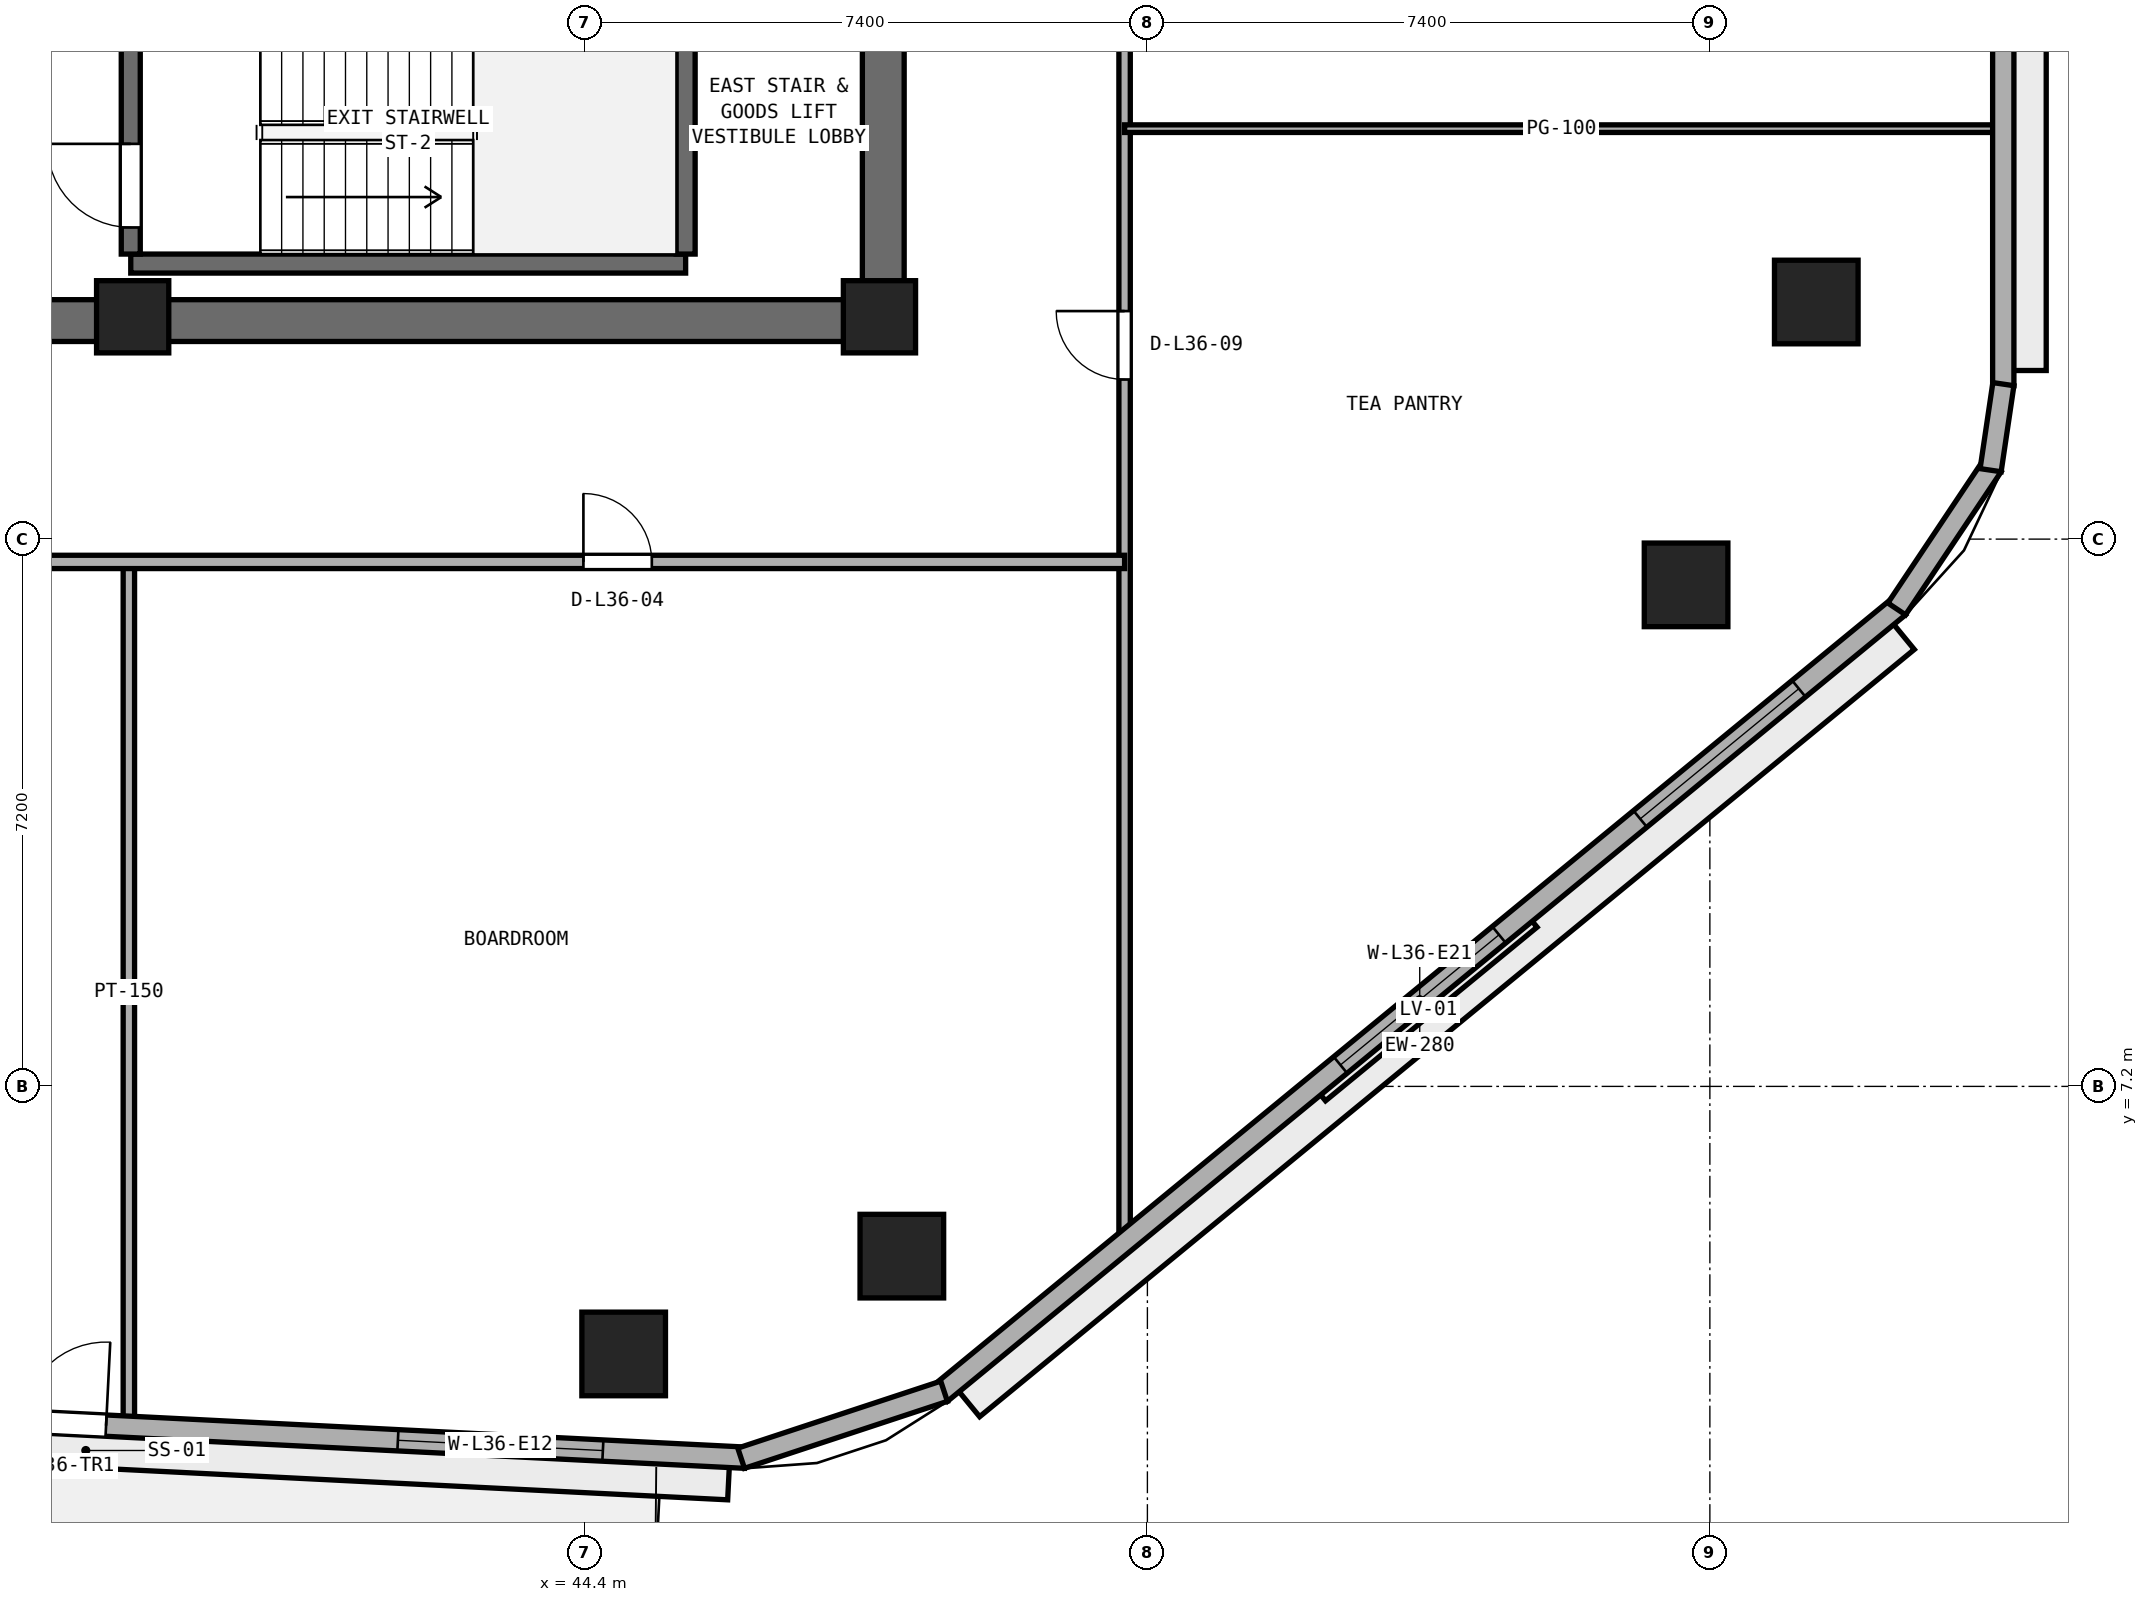
"""IFC4 building model, lengths in metres.
Left out: names, types, materials, properties, quantities, classifications, styles, units other than length and angle.
Written with IfcOpenShell. Run it as: python <this file> out.ifc"""

import sys

from ifc_helpers import new_model, si_unit, direction, frame, frame_2d, origin, origin_2d, place, context, subcontext, project, spatial, rectangle, extrude, element, fill, save


model = new_model("IFC4")
c1 = context("Model", 3, precision=1e-05, world=origin(), true_north=direction((0.0, 1.0)))
c2 = subcontext(c1, "Body", "Model", "MODEL_VIEW")
j1 = project(units=[si_unit("LENGTHUNIT", "METRE"), si_unit("PLANEANGLEUNIT", "RADIAN")], contexts=[c1])
p1 = place(None, origin())
s1 = spatial("IfcSite", under=j1, at=p1, CompositionType="ELEMENT")
p2 = place(p1, origin())
s2 = spatial("IfcBuilding", under=s1, at=p2, CompositionType="ELEMENT")
p3 = place(p2, frame((0.0, 0.0, 144.0)))
s3 = spatial("IfcBuildingStorey", under=s2, at=p3, CompositionType="ELEMENT", Elevation=144.0)
p4 = place(p3, frame((25.4, 17.275, 0.0), z_axis=(0.0, 0.0, 1.0), x_axis=(1.0, 0.0, 0.0)))
e1 = element("IfcWall", 1, at=p4, inside=s3, PredefinedType="SHEAR", context=c2, shape_type="SweptSolid", body=[
    extrude(rectangle(XDim=23.2, YDim=0.55, at=frame_2d((11.6, 0.0))), origin(), (0.0, 0.0, 1.0), 3.54),
])
p5 = place(p3, frame((48.325, 17.55, 0.0), z_axis=(0.0, 0.0, 1.0), x_axis=(0.0, 1.0, 0.0)))
e2 = element("IfcWall", 2, at=p5, inside=s3, PredefinedType="SHEAR", context=c2, shape_type="SweptSolid", body=[
    extrude(rectangle(XDim=15.3, YDim=0.55, at=frame_2d((7.65, 0.0))), origin(), (0.0, 0.0, 1.0), 3.54),
])
p6 = place(p5, frame((5.75, 0.0, 0.0)))
e3 = element("IfcOpeningElement", 3, at=p6, cuts=e2, PredefinedType="OPENING", context=c2, shape_type="SweptSolid", body=[
    extrude(rectangle(XDim=1.5, YDim=2.15, at=frame_2d((0.75, 1.075))), frame((0.0, 0.285, 0.0), z_axis=(0.0, -1.0, 0.0), x_axis=(1.0, 0.0, 0.0)), (0.0, 0.0, 1.0), 0.57),
])
for number, where, z_axis, x_axis in (
    (4, (38.45, 17.325, 0.0), (0.0, 0.0, 1.0), (1.0, 0.0, 0.0)),
    (5, (48.275, 17.325, 0.0), (0.0, 0.0, 1.0), (1.0, 0.0, 0.0)),
):
    element("IfcColumn", number, at=place(p3, frame(where, z_axis=z_axis, x_axis=x_axis)), inside=s3, PredefinedType="PILASTER", context=c2, shape_type="SweptSolid", body=[
        extrude(rectangle(XDim=0.95, YDim=0.95, at=origin_2d()), origin(), (0.0, 0.0, 1.0), 3.8),
    ])
for number, where, z_axis, x_axis in (
    (6, (44.91, 3.68, 0.0), (0.0, 0.0, 1.0), (1.0, 0.0, 0.0)),
    (7, (48.57, 4.967, 0.0), (0.0, 0.0, 1.0), (1.0, 0.0, 0.0)),
    (8, (58.887, 13.798, 0.0), (0.0, 0.0, 1.0), (1.0, 0.0, 0.0)),
    (9, (60.6, 17.519, 0.0), (0.0, 0.0, 1.0), (1.0, 0.0, 0.0)),
):
    element("IfcColumn", number, at=place(p3, frame(where, z_axis=z_axis, x_axis=x_axis)), inside=s3, PredefinedType="COLUMN", context=c2, shape_type="SweptSolid", body=[
        extrude(rectangle(XDim=1.1, YDim=1.1, at=origin_2d()), origin(), (0.0, 0.0, 1.0), 3.8),
    ])
p7 = place(p3, frame((38.425, 18.025, 0.0), z_axis=(0.0, 0.0, 1.0), x_axis=(1.0, 0.0, 0.0)))
e10 = element("IfcWall", 10, at=p7, inside=s3, PredefinedType="SHEAR", context=c2, shape_type="SweptSolid", body=[
    extrude(rectangle(XDim=7.3, YDim=0.25, at=frame_2d((3.65, 0.0))), origin(), (0.0, 0.0, 1.0), 3.54),
])
p8 = place(p3, frame((38.425, 18.15, 0.0), z_axis=(0.0, 0.0, 1.0), x_axis=(0.0, 1.0, 0.0)))
e11 = element("IfcWall", 11, at=p8, inside=s3, PredefinedType="SHEAR", context=c2, shape_type="SweptSolid", body=[
    extrude(rectangle(XDim=3.2, YDim=0.25, at=frame_2d((1.6, 0.0))), origin(), (0.0, 0.0, 1.0), 3.54),
])
p9 = place(p8, frame((0.35, 0.0, 0.0)))
e12 = element("IfcOpeningElement", 12, at=p9, cuts=e11, PredefinedType="OPENING", context=c2, shape_type="SweptSolid", body=[
    extrude(rectangle(XDim=1.1, YDim=2.15, at=frame_2d((0.55, 1.075))), frame((0.0, 0.135, 0.0), z_axis=(0.0, -1.0, 0.0), x_axis=(1.0, 0.0, 0.0)), (0.0, 0.0, 1.0), 0.27),
])
p10 = place(p3, frame((45.725, 18.15, 0.0), z_axis=(0.0, 0.0, 1.0), x_axis=(0.0, 1.0, 0.0)))
e13 = element("IfcWall", 13, at=p10, inside=s3, PredefinedType="SHEAR", context=c2, shape_type="SweptSolid", body=[
    extrude(rectangle(XDim=3.2, YDim=0.25, at=frame_2d((1.6, 0.0))), origin(), (0.0, 0.0, 1.0), 3.54),
])
p11 = place(p3, frame((51.5, 5.11, 0.0), z_axis=(0.0, 0.0, 1.0), x_axis=(0.0, 1.0, 0.0)))
e14 = element("IfcWall", 14, at=p11, inside=s3, PredefinedType="PARTITIONING", context=c2, shape_type="SweptSolid", body=[
    extrude(rectangle(XDim=18.74, YDim=0.15, at=frame_2d((9.37, 0.0))), origin(), (0.0, 0.0, 1.0), 3.54),
])
p12 = place(p11, frame((11.39, 0.0, 0.0)))
e15 = element("IfcOpeningElement", 15, at=p12, cuts=e14, PredefinedType="OPENING", context=c2, shape_type="SweptSolid", body=[
    extrude(rectangle(XDim=0.9, YDim=2.1, at=frame_2d((0.45, 1.05))), frame((0.0, 0.085, 0.0), z_axis=(0.0, -1.0, 0.0), x_axis=(1.0, 0.0, 0.0)), (0.0, 0.0, 1.0), 0.17),
])
p13 = place(p3, frame((38.4, 2.787, 0.0), z_axis=(0.0, 0.0, 1.0), x_axis=(0.0, 1.0, 0.0)))
e16 = element("IfcWall", 16, at=p13, inside=s3, PredefinedType="PARTITIONING", context=c2, shape_type="SweptSolid", body=[
    extrude(rectangle(XDim=11.313, YDim=0.15, at=frame_2d((5.657, 0.0))), origin(), (0.0, 0.0, 1.0), 3.54),
])
p14 = place(p3, frame((22.5, 14.1, 0.0), z_axis=(0.0, 0.0, 1.0), x_axis=(1.0, 0.0, 0.0)))
e17 = element("IfcWall", 17, at=p14, inside=s3, PredefinedType="PARTITIONING", context=c2, shape_type="SweptSolid", body=[
    extrude(rectangle(XDim=29.0, YDim=0.175, at=frame_2d((14.5, 0.0))), origin(), (0.0, 0.0, 1.0), 3.54),
])
p15 = place(p14, frame((7.57, 0.0, 0.0)))
e18 = element("IfcOpeningElement", 18, at=p15, cuts=e17, PredefinedType="OPENING", context=c2, shape_type="SweptSolid", body=[
    extrude(rectangle(XDim=1.0, YDim=2.12, at=frame_2d((0.5, 1.06))), frame((0.0, 0.097, 0.0), z_axis=(0.0, -1.0, 0.0), x_axis=(1.0, 0.0, 0.0)), (0.0, 0.0, 1.0), 0.195),
])
p16 = place(p14, frame((21.88, 0.0, 0.0)))
e19 = element("IfcOpeningElement", 19, at=p16, cuts=e17, PredefinedType="OPENING", context=c2, shape_type="SweptSolid", body=[
    extrude(rectangle(XDim=0.9, YDim=2.1, at=frame_2d((0.45, 1.05))), frame((0.0, 0.097, 0.0), z_axis=(0.0, -1.0, 0.0), x_axis=(1.0, 0.0, 0.0)), (0.0, 0.0, 1.0), 0.195),
])
p17 = place(p3, frame((51.5, 19.8, 0.0), z_axis=(0.0, 0.0, 1.0), x_axis=(1.0, 0.0, 0.0)))
e20 = element("IfcWall", 20, at=p17, inside=s3, PredefinedType="PARTITIONING", context=c2, shape_type="SweptSolid", body=[
    extrude(rectangle(XDim=11.495, YDim=0.1, at=frame_2d((5.748, 0.0))), origin(), (0.0, 0.0, 1.0), 3.54),
])
p18 = place(p3, frame((29.195, 3.184, 0.0), z_axis=(0.0, 0.0, 1.0), x_axis=(0.998743400978, -0.05011605535, 0.0)))
e21 = element("IfcWall", 21, at=p18, inside=s3, PredefinedType="STANDARD", context=c2, shape_type="SweptSolid", body=[
    extrude(rectangle(XDim=17.333, YDim=0.28, at=frame_2d((8.667, 0.0))), origin(), (0.0, 0.0, 1.0), 3.54),
])
p19 = place(p18, frame((7.816, 0.0, 0.0)))
e22 = element("IfcOpeningElement", 22, at=p19, cuts=e21, PredefinedType="OPENING", context=c2, shape_type="SweptSolid", body=[
    extrude(rectangle(XDim=1.1, YDim=2.2, at=frame_2d((0.55, 1.1))), frame((0.0, 0.15, 0.0), z_axis=(0.0, -1.0, 0.0), x_axis=(1.0, 0.0, 0.0)), (0.0, 0.0, 1.0), 0.3),
])
p20 = place(p18, frame((1.872, 0.0, 0.9)))
e23 = element("IfcOpeningElement", 23, at=p20, cuts=e21, PredefinedType="OPENING", context=c2, shape_type="SweptSolid", body=[
    extrude(rectangle(XDim=2.7, YDim=1.75, at=frame_2d((1.35, 0.875))), frame((0.0, 0.15, 0.0), z_axis=(0.0, -1.0, 0.0), x_axis=(1.0, 0.0, 0.0)), (0.0, 0.0, 1.0), 0.3),
])
p21 = place(p18, frame((12.76, 0.0, 0.9)))
e24 = element("IfcOpeningElement", 24, at=p21, cuts=e21, PredefinedType="OPENING", context=c2, shape_type="SweptSolid", body=[
    extrude(rectangle(XDim=2.7, YDim=1.75, at=frame_2d((1.35, 0.875))), frame((0.0, 0.15, 0.0), z_axis=(0.0, -1.0, 0.0), x_axis=(1.0, 0.0, 0.0)), (0.0, 0.0, 1.0), 0.3),
])
p22 = place(p3, frame((49.08, 3.164, 0.0), z_axis=(0.0, 0.0, 1.0), x_axis=(0.772937830186, 0.634481765433, 0.0)))
e25 = element("IfcWall", 25, at=p22, inside=s3, PredefinedType="STANDARD", context=c2, shape_type="SweptSolid", body=[
    extrude(rectangle(XDim=16.309, YDim=0.28, at=frame_2d((8.154, 0.0))), origin(), (0.0, 0.0, 1.0), 3.54),
])
p23 = place(p22, frame((6.804, 0.0, 0.9)))
e26 = element("IfcOpeningElement", 26, at=p23, cuts=e25, PredefinedType="OPENING", context=c2, shape_type="SweptSolid", body=[
    extrude(rectangle(XDim=2.7, YDim=1.75, at=frame_2d((1.35, 0.875))), frame((0.0, 0.15, 0.0), z_axis=(0.0, -1.0, 0.0), x_axis=(1.0, 0.0, 0.0)), (0.0, 0.0, 1.0), 0.3),
])
p24 = place(p22, frame((11.907, 0.0, 0.9)))
e27 = element("IfcOpeningElement", 27, at=p24, cuts=e25, PredefinedType="OPENING", context=c2, shape_type="SweptSolid", body=[
    extrude(rectangle(XDim=2.7, YDim=1.75, at=frame_2d((1.35, 0.875))), frame((0.0, 0.15, 0.0), z_axis=(0.0, -1.0, 0.0), x_axis=(1.0, 0.0, 0.0)), (0.0, 0.0, 1.0), 0.3),
])
p25 = place(p3, frame((63.06, 16.418, 0.0), z_axis=(0.0, 0.0, 1.0), x_axis=(0.0, 1.0, 0.0)))
e28 = element("IfcWall", 28, at=p25, inside=s3, PredefinedType="STANDARD", context=c2, shape_type="SweptSolid", body=[
    extrude(rectangle(XDim=18.812, YDim=0.28, at=frame_2d((9.406, 0.0))), origin(), (0.0, 0.0, 1.0), 3.54),
])
p26 = place(p25, frame((13.743, 0.0, 0.9)))
e29 = element("IfcOpeningElement", 29, at=p26, cuts=e28, PredefinedType="OPENING", context=c2, shape_type="SweptSolid", body=[
    extrude(rectangle(XDim=2.7, YDim=1.75, at=frame_2d((1.35, 0.875))), frame((0.0, 0.15, 0.0), z_axis=(0.0, -1.0, 0.0), x_axis=(1.0, 0.0, 0.0)), (0.0, 0.0, 1.0), 0.3),
])
p27 = place(p3, frame((46.455, 2.309, 0.0), z_axis=(0.0, 0.0, 1.0), x_axis=(0.949677222099, 0.313230224955, 0.0)))
e30 = element("IfcWall", 30, at=p27, inside=s3, PredefinedType="STANDARD", context=c2, shape_type="SweptSolid", body=[
    extrude(rectangle(XDim=2.811, YDim=0.28, at=frame_2d((1.406, 0.0))), origin(), (0.0, 0.0, 1.0), 3.54),
])
p28 = place(p3, frame((61.658, 13.482, 0.0), z_axis=(0.0, 0.0, 1.0), x_axis=(0.555521224344, 0.831502356764, 0.0)))
e31 = element("IfcWall", 31, at=p28, inside=s3, PredefinedType="STANDARD", context=c2, shape_type="SweptSolid", body=[
    extrude(rectangle(XDim=2.264, YDim=0.28, at=frame_2d((1.132, 0.0))), origin(), (0.0, 0.0, 1.0), 3.54),
])
p29 = place(p3, frame((62.894, 15.307, 0.0), z_axis=(0.0, 0.0, 1.0), x_axis=(0.146796104284, 0.989166772474, 0.0)))
e32 = element("IfcWall", 32, at=p29, inside=s3, PredefinedType="STANDARD", context=c2, shape_type="SweptSolid", body=[
    extrude(rectangle(XDim=1.144, YDim=0.28, at=frame_2d((0.572, 0.0))), origin(), (0.0, 0.0, 1.0), 3.54),
])
p30 = place(p9, origin())
e33 = element("IfcDoor", 33, at=p30, inside=s3, OperationType="SINGLE_SWING_RIGHT", PredefinedType="DOOR", context=c2, shape_type="SweptSolid", body=[
    extrude(rectangle(XDim=1.1, YDim=2.15, at=frame_2d((0.55, 1.075))), frame((0.0, 0.025, 0.0), z_axis=(0.0, -1.0, 0.0), x_axis=(1.0, 0.0, 0.0)), (0.0, 0.0, 1.0), 0.05),
])
fill(e12, e33)
p31 = place(p16, origin())
e34 = element("IfcDoor", 34, at=p31, inside=s3, OperationType="SINGLE_SWING_LEFT", PredefinedType="DOOR", context=c2, shape_type="SweptSolid", body=[
    extrude(rectangle(XDim=0.9, YDim=2.1, at=frame_2d((0.45, 1.05))), frame((0.0, 0.025, 0.0), z_axis=(0.0, -1.0, 0.0), x_axis=(1.0, 0.0, 0.0)), (0.0, 0.0, 1.0), 0.05),
])
fill(e19, e34)
p32 = place(p12, origin())
e35 = element("IfcDoor", 35, at=p32, inside=s3, OperationType="SINGLE_SWING_RIGHT", PredefinedType="DOOR", context=c2, shape_type="SweptSolid", body=[
    extrude(rectangle(XDim=0.9, YDim=2.1, at=frame_2d((0.45, 1.05))), frame((0.0, 0.025, 0.0), z_axis=(0.0, -1.0, 0.0), x_axis=(1.0, 0.0, 0.0)), (0.0, 0.0, 1.0), 0.05),
])
fill(e15, e35)
p33 = place(p19, origin())
e36 = element("IfcDoor", 36, at=p33, inside=s3, OperationType="SINGLE_SWING_RIGHT", PredefinedType="DOOR", context=c2, shape_type="SweptSolid", body=[
    extrude(rectangle(XDim=1.1, YDim=2.2, at=frame_2d((0.55, 1.1))), frame((0.0, 0.025, 0.0), z_axis=(0.0, -1.0, 0.0), x_axis=(1.0, 0.0, 0.0)), (0.0, 0.0, 1.0), 0.05),
])
fill(e22, e36)
p34 = place(p21, origin())
e37 = element("IfcWindow", 37, at=p34, inside=s3, PartitioningType="SINGLE_PANEL", PredefinedType="WINDOW", context=c2, shape_type="SweptSolid", body=[
    extrude(rectangle(XDim=2.7, YDim=1.75, at=frame_2d((1.35, 0.875))), frame((0.0, 0.03, 0.0), z_axis=(0.0, -1.0, 0.0), x_axis=(1.0, 0.0, 0.0)), (0.0, 0.0, 1.0), 0.06),
])
fill(e24, e37)
p35 = place(p23, origin())
e38 = element("IfcWindow", 38, at=p35, inside=s3, PartitioningType="SINGLE_PANEL", PredefinedType="WINDOW", context=c2, shape_type="SweptSolid", body=[
    extrude(rectangle(XDim=2.7, YDim=1.75, at=frame_2d((1.35, 0.875))), frame((0.0, 0.03, 0.0), z_axis=(0.0, -1.0, 0.0), x_axis=(1.0, 0.0, 0.0)), (0.0, 0.0, 1.0), 0.06),
])
fill(e26, e38)
p36 = place(p24, origin())
e39 = element("IfcWindow", 39, at=p36, inside=s3, PartitioningType="SINGLE_PANEL", PredefinedType="WINDOW", context=c2, shape_type="SweptSolid", body=[
    extrude(rectangle(XDim=2.7, YDim=1.75, at=frame_2d((1.35, 0.875))), frame((0.0, 0.03, 0.0), z_axis=(0.0, -1.0, 0.0), x_axis=(1.0, 0.0, 0.0)), (0.0, 0.0, 1.0), 0.06),
])
fill(e27, e39)
save(model, sys.argv[1])
